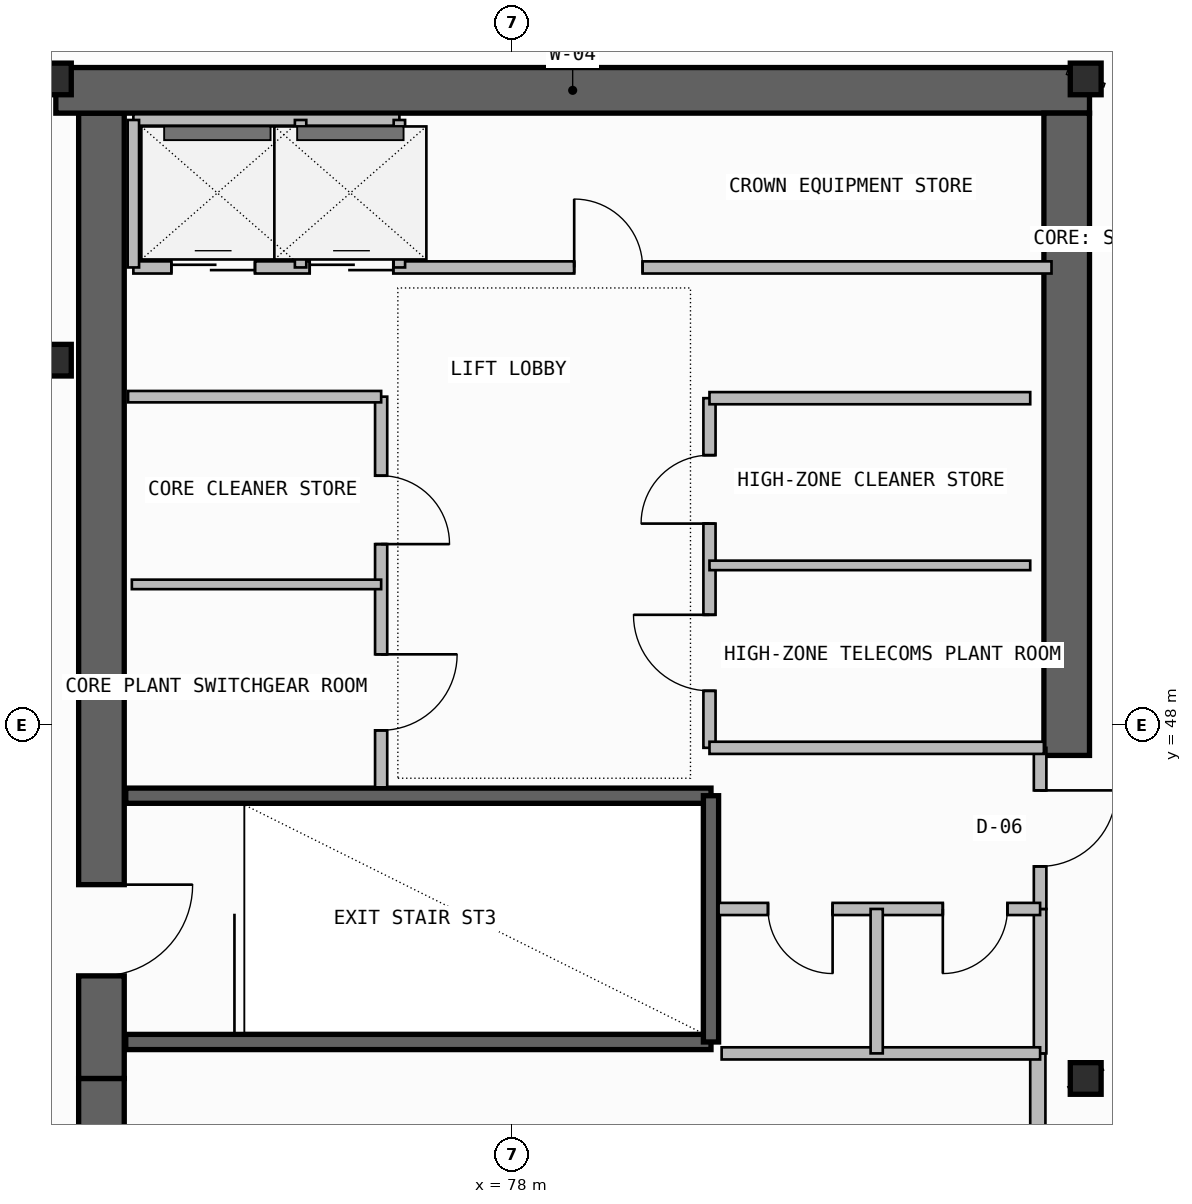
"""IFC4 building model, lengths in metres.
Left out: names, types, materials, properties, quantities, classifications, styles, units other than length and angle.
Written with IfcOpenShell. Run it as: python <this file> out.ifc"""

import sys

from ifc_helpers import new_model, si_unit, direction, frame, frame_2d, origin, origin_2d, place, context, subcontext, project, spatial, rectangle, i_section, extrude, element, fill, save


model = new_model("IFC4")
c1 = context("Model", 3, precision=1e-05, world=origin(), true_north=direction((0.0, 1.0)))
c2 = subcontext(c1, "Body", "Model", "MODEL_VIEW")
j1 = project(units=[si_unit("LENGTHUNIT", "METRE"), si_unit("PLANEANGLEUNIT", "RADIAN")], contexts=[c1])
p1 = place(None, origin())
s1 = spatial("IfcSite", under=j1, at=p1, CompositionType="ELEMENT")
p2 = place(p1, origin())
s2 = spatial("IfcBuilding", under=s1, at=p2, CompositionType="ELEMENT")
p3 = place(p2, frame((0.0, 0.0, 292.42)))
s3 = spatial("IfcBuildingStorey", under=s2, at=p3, CompositionType="ELEMENT", Elevation=292.42)
p4 = place(p3, frame((72.6, 35.5, -0.26), z_axis=(0.0, 0.0, 1.0), x_axis=(0.0, 1.0, 0.0)))
e1 = element("IfcWall", 1, at=p4, inside=s3, PredefinedType="SHEAR", context=c2, shape_type="SweptSolid", body=[
    extrude(rectangle(XDim=7.85, YDim=0.6, at=frame_2d((3.925, 0.0))), origin(), (0.0, 0.0, 1.0), 5.82),
])
p5 = place(p4, frame((1.45, 0.0, 0.26)))
e2 = element("IfcOpeningElement", 2, at=p5, cuts=e1, PredefinedType="OPENING", context=c2, shape_type="SweptSolid", body=[
    extrude(rectangle(XDim=1.2, YDim=2.2, at=frame_2d((0.6, 1.1))), frame((0.0, 0.31, 0.0), z_axis=(0.0, -1.0, 0.0), x_axis=(1.0, 0.0, 0.0)), (0.0, 0.0, 1.0), 0.62),
])
p6 = place(p3, frame((72.6, 43.35, -0.26), z_axis=(0.0, 0.0, 1.0), x_axis=(0.0, 1.0, 0.0)))
e3 = element("IfcWall", 3, at=p6, inside=s3, PredefinedType="SHEAR", context=c2, shape_type="SweptSolid", body=[
    extrude(rectangle(XDim=12.7, YDim=0.6, at=frame_2d((6.35, 0.0))), origin(), (0.0, 0.0, 1.0), 5.82),
])
p7 = place(p6, frame((1.35, 0.0, 0.26)))
e4 = element("IfcOpeningElement", 4, at=p7, cuts=e3, PredefinedType="OPENING", context=c2, shape_type="SweptSolid", body=[
    extrude(rectangle(XDim=1.2, YDim=2.2, at=frame_2d((0.6, 1.1))), frame((0.0, 0.31, 0.0), z_axis=(0.0, -1.0, 0.0), x_axis=(1.0, 0.0, 0.0)), (0.0, 0.0, 1.0), 0.62),
])
p8 = place(p3, frame((72.0, 56.35, -0.26), z_axis=(0.0, 0.0, 1.0), x_axis=(1.0, 0.0, 0.0)))
e5 = element("IfcWall", 5, at=p8, inside=s3, PredefinedType="SHEAR", context=c2, shape_type="SweptSolid", body=[
    extrude(rectangle(XDim=13.6, YDim=0.6, at=frame_2d((6.8, 0.0))), origin(), (0.0, 0.0, 1.0), 5.82),
])
p9 = place(p3, frame((85.3, 47.6, -0.26), z_axis=(0.0, 0.0, 1.0), x_axis=(0.0, 1.0, 0.0)))
e6 = element("IfcWall", 6, at=p9, inside=s3, PredefinedType="SHEAR", context=c2, shape_type="SweptSolid", body=[
    extrude(rectangle(XDim=8.45, YDim=0.6, at=frame_2d((4.225, 0.0))), origin(), (0.0, 0.0, 1.0), 5.82),
])
for number, where, z_axis, x_axis in (
    (7, (85.55, 43.35, 0.0), (0.0, 0.0, 1.0), (1.0, 0.0, 0.0)),
    (8, (72.0, 52.8, 0.0), (0.0, 0.0, 1.0), (1.0, 0.0, 0.0)),
    (9, (72.0, 56.5, 0.0), (0.0, 0.0, 1.0), (1.0, 0.0, 0.0)),
    (10, (85.55, 56.5, 0.0), (0.0, 0.0, 1.0), (1.0, 0.0, 0.0)),
):
    element("IfcColumn", number, at=place(p3, frame(where, z_axis=z_axis, x_axis=x_axis)), inside=s3, PredefinedType="COLUMN", context=c2, shape_type="SweptSolid", body=[
        extrude(i_section(OverallWidth=0.406, OverallDepth=0.416, WebThickness=0.03, FlangeThickness=0.048, FilletRadius=0.015, at=origin_2d()), origin(), (0.0, 0.0, 1.0), 5.76),
    ])
p10 = place(p3, frame((84.92, 38.85, 0.0), z_axis=(0.0, 0.0, 1.0), x_axis=(0.0, 1.0, 0.0)))
e11 = element("IfcWall", 11, at=p10, inside=s3, PredefinedType="SOLIDWALL", context=c2, shape_type="SweptSolid", body=[
    extrude(rectangle(XDim=4.83, YDim=0.2, at=frame_2d((2.415, 0.0))), origin(), (0.0, 0.0, 1.0), 5.56),
])
p11 = place(p10, frame((1.25, 0.0, 0.0)))
e12 = element("IfcOpeningElement", 12, at=p11, cuts=e11, PredefinedType="OPENING", context=c2, shape_type="SweptSolid", body=[
    extrude(rectangle(XDim=1.1, YDim=2.2, at=frame_2d((0.55, 1.1))), frame((0.0, 0.11, 0.0), z_axis=(0.0, -1.0, 0.0), x_axis=(1.0, 0.0, 0.0)), (0.0, 0.0, 1.0), 0.22),
])
for number, where, z_axis, x_axis in (
    (13, (72.92, 43.83, -0.26), (0.0, 0.0, 1.0), (1.0, 0.0, 0.0)),
    (14, (72.92, 47.07, -0.26), (0.0, 0.0, 1.0), (1.0, 0.0, 0.0)),
):
    element("IfcWall", number, at=place(p3, frame(where, z_axis=z_axis, x_axis=x_axis)), inside=s3, PredefinedType="SOLIDWALL", context=c2, shape_type="SweptSolid", body=[
        extrude(rectangle(XDim=7.7, YDim=0.2, at=frame_2d((3.85, 0.0))), origin(), (0.0, 0.0, 1.0), 5.82),
    ])
p12 = place(p3, frame((80.62, 43.83, -0.26), z_axis=(0.0, 0.0, 1.0), x_axis=(0.0, 1.0, 0.0)))
e15 = element("IfcWall", 15, at=p12, inside=s3, PredefinedType="SOLIDWALL", context=c2, shape_type="SweptSolid", body=[
    extrude(rectangle(XDim=3.24, YDim=0.2, at=frame_2d((1.62, 0.0))), origin(), (0.0, 0.0, 1.0), 5.82),
])
p13 = place(p3, frame((84.95, 43.68, 0.0), z_axis=(0.0, 0.0, 1.0), x_axis=(0.0, 1.0, 0.0)))
e16 = element("IfcWall", 16, at=p13, inside=s3, PredefinedType="PLUMBINGWALL", context=c2, shape_type="SweptSolid", body=[
    extrude(rectangle(XDim=1.9, YDim=0.165, at=frame_2d((0.95, 0.0))), origin(), (0.0, 0.0, 1.0), 5.56),
])
p14 = place(p3, frame((84.95, 45.58, 0.0), z_axis=(0.0, 0.0, 1.0), x_axis=(0.0, 1.0, 0.0)))
e17 = element("IfcWall", 17, at=p14, inside=s3, PredefinedType="PARTITIONING", context=c2, shape_type="SweptSolid", body=[
    extrude(rectangle(XDim=2.12, YDim=0.165, at=frame_2d((1.06, 0.0))), origin(), (0.0, 0.0, 1.0), 5.56),
])
p15 = place(p14, frame((0.56, 0.0, 0.0)))
e18 = element("IfcOpeningElement", 18, at=p15, cuts=e17, PredefinedType="OPENING", context=c2, shape_type="SweptSolid", body=[
    extrude(rectangle(XDim=1.0, YDim=2.2, at=frame_2d((0.5, 1.1))), frame((0.0, 0.093, 0.0), z_axis=(0.0, -1.0, 0.0), x_axis=(1.0, 0.0, 0.0)), (0.0, 0.0, 1.0), 0.185),
])
p16 = place(p3, frame((80.72, 45.58, 0.0), z_axis=(0.0, 0.0, 1.0), x_axis=(1.0, 0.0, 0.0)))
e19 = element("IfcWall", 19, at=p16, inside=s3, PredefinedType="PLUMBINGWALL", context=c2, shape_type="SweptSolid", body=[
    extrude(rectangle(XDim=4.23, YDim=0.16, at=frame_2d((2.115, 0.0))), origin(), (0.0, 0.0, 1.0), 5.56),
])
p17 = place(p16, frame((0.65, 0.0, 0.0)))
e20 = element("IfcOpeningElement", 20, at=p17, cuts=e19, PredefinedType="OPENING", context=c2, shape_type="SweptSolid", body=[
    extrude(rectangle(XDim=0.85, YDim=2.05, at=frame_2d((0.425, 1.025))), frame((0.0, 0.09, 0.0), z_axis=(0.0, -1.0, 0.0), x_axis=(1.0, 0.0, 0.0)), (0.0, 0.0, 1.0), 0.18),
])
p18 = place(p16, frame((2.95, 0.0, 0.0)))
e21 = element("IfcOpeningElement", 21, at=p18, cuts=e19, PredefinedType="OPENING", context=c2, shape_type="SweptSolid", body=[
    extrude(rectangle(XDim=0.85, YDim=2.05, at=frame_2d((0.425, 1.025))), frame((0.0, 0.09, 0.0), z_axis=(0.0, -1.0, 0.0), x_axis=(1.0, 0.0, 0.0)), (0.0, 0.0, 1.0), 0.18),
])
p19 = place(p3, frame((80.76, 43.68, 0.0), z_axis=(0.0, 0.0, 1.0), x_axis=(1.0, 0.0, 0.0)))
e22 = element("IfcWall", 22, at=p19, inside=s3, PredefinedType="PLUMBINGWALL", context=c2, shape_type="SweptSolid", body=[
    extrude(rectangle(XDim=4.19, YDim=0.16, at=frame_2d((2.095, 0.0))), origin(), (0.0, 0.0, 1.0), 5.56),
])
p20 = place(p3, frame((82.8, 43.68, 0.0), z_axis=(0.0, 0.0, 1.0), x_axis=(0.0, 1.0, 0.0)))
e23 = element("IfcWall", 23, at=p20, inside=s3, PredefinedType="PLUMBINGWALL", context=c2, shape_type="SweptSolid", body=[
    extrude(rectangle(XDim=1.9, YDim=0.16, at=frame_2d((0.95, 0.0))), origin(), (0.0, 0.0, 1.0), 5.56),
])
p21 = place(p3, frame((76.28, 47.18, 0.0), z_axis=(0.0, 0.0, 1.0), x_axis=(0.0, 1.0, 0.0)))
e24 = element("IfcWall", 24, at=p21, inside=s3, PredefinedType="SOLIDWALL", context=c2, shape_type="SweptSolid", body=[
    extrude(rectangle(XDim=5.14, YDim=0.16, at=frame_2d((2.57, 0.0))), origin(), (0.0, 0.0, 1.0), 5.56),
])
p22 = place(p21, frame((0.75, 0.0, 0.0)))
e25 = element("IfcOpeningElement", 25, at=p22, cuts=e24, PredefinedType="OPENING", context=c2, shape_type="SweptSolid", body=[
    extrude(rectangle(XDim=1.0, YDim=2.2, at=frame_2d((0.5, 1.1))), frame((0.0, 0.09, 0.0), z_axis=(0.0, -1.0, 0.0), x_axis=(1.0, 0.0, 0.0)), (0.0, 0.0, 1.0), 0.18),
])
p23 = place(p21, frame((3.2, 0.0, 0.0)))
e26 = element("IfcOpeningElement", 26, at=p23, cuts=e24, PredefinedType="OPENING", context=c2, shape_type="SweptSolid", body=[
    extrude(rectangle(XDim=0.9, YDim=2.1, at=frame_2d((0.45, 1.05))), frame((0.0, 0.09, 0.0), z_axis=(0.0, -1.0, 0.0), x_axis=(1.0, 0.0, 0.0)), (0.0, 0.0, 1.0), 0.18),
])
p24 = place(p3, frame((72.95, 52.32, 0.0), z_axis=(0.0, 0.0, 1.0), x_axis=(1.0, 0.0, 0.0)))
e27 = element("IfcWall", 27, at=p24, inside=s3, PredefinedType="SOLIDWALL", context=c2, shape_type="SweptSolid", body=[
    extrude(rectangle(XDim=3.33, YDim=0.15, at=frame_2d((1.665, 0.0))), origin(), (0.0, 0.0, 1.0), 5.56),
])
p25 = place(p3, frame((73.0, 49.85, 0.0), z_axis=(0.0, 0.0, 1.0), x_axis=(1.0, 0.0, 0.0)))
e28 = element("IfcWall", 28, at=p25, inside=s3, PredefinedType="PARTITIONING", context=c2, shape_type="SweptSolid", body=[
    extrude(rectangle(XDim=3.28, YDim=0.125, at=frame_2d((1.64, 0.0))), origin(), (0.0, 0.0, 1.0), 5.56),
])
p26 = place(p3, frame((80.6, 47.7, 0.0), z_axis=(0.0, 0.0, 1.0), x_axis=(0.0, 1.0, 0.0)))
e29 = element("IfcWall", 29, at=p26, inside=s3, PredefinedType="SOLIDWALL", context=c2, shape_type="SweptSolid", body=[
    extrude(rectangle(XDim=4.6, YDim=0.16, at=frame_2d((2.3, 0.0))), origin(), (0.0, 0.0, 1.0), 5.56),
])
p27 = place(p26, frame((0.75, 0.0, 0.0)))
e30 = element("IfcOpeningElement", 30, at=p27, cuts=e29, PredefinedType="OPENING", context=c2, shape_type="SweptSolid", body=[
    extrude(rectangle(XDim=1.0, YDim=2.2, at=frame_2d((0.5, 1.1))), frame((0.0, 0.09, 0.0), z_axis=(0.0, -1.0, 0.0), x_axis=(1.0, 0.0, 0.0)), (0.0, 0.0, 1.0), 0.18),
])
p28 = place(p26, frame((2.95, 0.0, 0.0)))
e31 = element("IfcOpeningElement", 31, at=p28, cuts=e29, PredefinedType="OPENING", context=c2, shape_type="SweptSolid", body=[
    extrude(rectangle(XDim=0.9, YDim=2.1, at=frame_2d((0.45, 1.05))), frame((0.0, 0.09, 0.0), z_axis=(0.0, -1.0, 0.0), x_axis=(1.0, 0.0, 0.0)), (0.0, 0.0, 1.0), 0.18),
])
p29 = place(p3, frame((80.6, 47.7, 0.0), z_axis=(0.0, 0.0, 1.0), x_axis=(1.0, 0.0, 0.0)))
e32 = element("IfcWall", 32, at=p29, inside=s3, PredefinedType="SOLIDWALL", context=c2, shape_type="SweptSolid", body=[
    extrude(rectangle(XDim=4.4, YDim=0.16, at=frame_2d((2.2, 0.0))), origin(), (0.0, 0.0, 1.0), 5.56),
])
p30 = place(p3, frame((80.6, 52.3, 0.0), z_axis=(0.0, 0.0, 1.0), x_axis=(1.0, 0.0, 0.0)))
e33 = element("IfcWall", 33, at=p30, inside=s3, PredefinedType="SOLIDWALL", context=c2, shape_type="SweptSolid", body=[
    extrude(rectangle(XDim=4.22, YDim=0.16, at=frame_2d((2.11, 0.0))), origin(), (0.0, 0.0, 1.0), 5.56),
])
p31 = place(p3, frame((80.6, 50.1, 0.0), z_axis=(0.0, 0.0, 1.0), x_axis=(1.0, 0.0, 0.0)))
e34 = element("IfcWall", 34, at=p31, inside=s3, PredefinedType="PARTITIONING", context=c2, shape_type="SweptSolid", body=[
    extrude(rectangle(XDim=4.22, YDim=0.125, at=frame_2d((2.11, 0.0))), origin(), (0.0, 0.0, 1.0), 5.56),
])
p32 = place(p3, frame((73.02, 54.02, 0.0), z_axis=(0.0, 0.0, 1.0), x_axis=(1.0, 0.0, 0.0)))
e35 = element("IfcWall", 35, at=p32, inside=s3, PredefinedType="SOLIDWALL", context=c2, shape_type="SweptSolid", body=[
    extrude(rectangle(XDim=12.08, YDim=0.16, at=frame_2d((6.04, 0.0))), origin(), (0.0, 0.0, 1.0), 5.56),
])
p33 = place(p32, frame((0.5, 0.0, 0.0)))
e36 = element("IfcOpeningElement", 36, at=p33, cuts=e35, PredefinedType="OPENING", context=c2, shape_type="SweptSolid", body=[
    extrude(rectangle(XDim=1.1, YDim=2.25, at=frame_2d((0.55, 1.125))), frame((0.0, 0.09, 0.0), z_axis=(0.0, -1.0, 0.0), x_axis=(1.0, 0.0, 0.0)), (0.0, 0.0, 1.0), 0.18),
])
p34 = place(p32, frame((2.32, 0.0, 0.0)))
e37 = element("IfcOpeningElement", 37, at=p34, cuts=e35, PredefinedType="OPENING", context=c2, shape_type="SweptSolid", body=[
    extrude(rectangle(XDim=1.1, YDim=2.25, at=frame_2d((0.55, 1.125))), frame((0.0, 0.09, 0.0), z_axis=(0.0, -1.0, 0.0), x_axis=(1.0, 0.0, 0.0)), (0.0, 0.0, 1.0), 0.18),
])
p35 = place(p32, frame((5.8, 0.0, 0.0)))
e38 = element("IfcOpeningElement", 38, at=p35, cuts=e35, PredefinedType="OPENING", context=c2, shape_type="SweptSolid", body=[
    extrude(rectangle(XDim=0.9, YDim=2.1, at=frame_2d((0.45, 1.05))), frame((0.0, 0.09, 0.0), z_axis=(0.0, -1.0, 0.0), x_axis=(1.0, 0.0, 0.0)), (0.0, 0.0, 1.0), 0.18),
])
p36 = place(p3, frame((73.02, 55.96, 0.0), z_axis=(0.0, 0.0, 1.0), x_axis=(1.0, 0.0, 0.0)))
e39 = element("IfcWall", 39, at=p36, inside=s3, PredefinedType="SOLIDWALL", context=c2, shape_type="SweptSolid", body=[
    extrude(rectangle(XDim=3.5, YDim=0.15, at=frame_2d((1.75, 0.0))), origin(), (0.0, 0.0, 1.0), 5.56),
])
p37 = place(p3, frame((73.02, 54.02, 0.0), z_axis=(0.0, 0.0, 1.0), x_axis=(0.0, 1.0, 0.0)))
e40 = element("IfcWall", 40, at=p37, inside=s3, PredefinedType="PLUMBINGWALL", context=c2, shape_type="SweptSolid", body=[
    extrude(rectangle(XDim=1.94, YDim=0.15, at=frame_2d((0.97, 0.0))), origin(), (0.0, 0.0, 1.0), 5.56),
])
p38 = place(p3, frame((76.52, 54.02, 0.0), z_axis=(0.0, 0.0, 1.0), x_axis=(0.0, 1.0, 0.0)))
e41 = element("IfcWall", 41, at=p38, inside=s3, PredefinedType="SOLIDWALL", context=c2, shape_type="SweptSolid", body=[
    extrude(rectangle(XDim=1.94, YDim=0.15, at=frame_2d((0.97, 0.0))), origin(), (0.0, 0.0, 1.0), 5.56),
])
p39 = place(p3, frame((75.22, 54.02, 0.0), z_axis=(0.0, 0.0, 1.0), x_axis=(0.0, 1.0, 0.0)))
e42 = element("IfcWall", 42, at=p39, inside=s3, PredefinedType="PLUMBINGWALL", context=c2, shape_type="SweptSolid", body=[
    extrude(rectangle(XDim=1.94, YDim=0.15, at=frame_2d((0.97, 0.0))), origin(), (0.0, 0.0, 1.0), 5.56),
])
p40 = place(p7, frame((1.2, 0.0, 0.0), z_axis=(0.0, 0.0, 1.0), x_axis=(-1.0, 0.0, 0.0)))
e43 = element("IfcDoor", 43, at=p40, inside=s3, OperationType="SINGLE_SWING_LEFT", PredefinedType="USERDEFINED", context=c2, shape_type="SweptSolid", body=[
    extrude(rectangle(XDim=1.2, YDim=2.2, at=frame_2d((0.6, 1.1))), frame((0.0, 0.025, 0.0), z_axis=(0.0, -1.0, 0.0), x_axis=(1.0, 0.0, 0.0)), (0.0, 0.0, 1.0), 0.05),
])
fill(e4, e43)
p41 = place(p15, frame((1.0, 0.0, 0.0), z_axis=(0.0, 0.0, 1.0), x_axis=(-1.0, 0.0, 0.0)))
e44 = element("IfcDoor", 44, at=p41, inside=s3, OperationType="SINGLE_SWING_LEFT", PredefinedType="DOOR", context=c2, shape_type="SweptSolid", body=[
    extrude(rectangle(XDim=1.0, YDim=2.2, at=frame_2d((0.5, 1.1))), frame((0.0, 0.025, 0.0), z_axis=(0.0, -1.0, 0.0), x_axis=(1.0, 0.0, 0.0)), (0.0, 0.0, 1.0), 0.05),
])
fill(e18, e44)
p42 = place(p17, frame((0.85, 0.0, 0.0), z_axis=(0.0, 0.0, 1.0), x_axis=(-1.0, 0.0, 0.0)))
e45 = element("IfcDoor", 45, at=p42, inside=s3, OperationType="SINGLE_SWING_LEFT", PredefinedType="DOOR", context=c2, shape_type="SweptSolid", body=[
    extrude(rectangle(XDim=0.85, YDim=2.05, at=frame_2d((0.425, 1.025))), frame((0.0, 0.025, 0.0), z_axis=(0.0, -1.0, 0.0), x_axis=(1.0, 0.0, 0.0)), (0.0, 0.0, 1.0), 0.05),
])
fill(e20, e45)
p43 = place(p18, frame((0.85, 0.0, 0.0), z_axis=(0.0, 0.0, 1.0), x_axis=(-1.0, 0.0, 0.0)))
e46 = element("IfcDoor", 46, at=p43, inside=s3, OperationType="SINGLE_SWING_RIGHT", PredefinedType="DOOR", context=c2, shape_type="SweptSolid", body=[
    extrude(rectangle(XDim=0.85, YDim=2.05, at=frame_2d((0.425, 1.025))), frame((0.0, 0.025, 0.0), z_axis=(0.0, -1.0, 0.0), x_axis=(1.0, 0.0, 0.0)), (0.0, 0.0, 1.0), 0.05),
])
fill(e21, e46)
p44 = place(p22, frame((1.0, 0.0, 0.0), z_axis=(0.0, 0.0, 1.0), x_axis=(-1.0, 0.0, 0.0)))
e47 = element("IfcDoor", 47, at=p44, inside=s3, OperationType="SINGLE_SWING_LEFT", PredefinedType="DOOR", context=c2, shape_type="SweptSolid", body=[
    extrude(rectangle(XDim=1.0, YDim=2.2, at=frame_2d((0.5, 1.1))), frame((0.0, 0.025, 0.0), z_axis=(0.0, -1.0, 0.0), x_axis=(1.0, 0.0, 0.0)), (0.0, 0.0, 1.0), 0.05),
])
fill(e25, e47)
p45 = place(p23, frame((0.9, 0.0, 0.0), z_axis=(0.0, 0.0, 1.0), x_axis=(-1.0, 0.0, 0.0)))
e48 = element("IfcDoor", 48, at=p45, inside=s3, OperationType="SINGLE_SWING_RIGHT", PredefinedType="DOOR", context=c2, shape_type="SweptSolid", body=[
    extrude(rectangle(XDim=0.9, YDim=2.1, at=frame_2d((0.45, 1.05))), frame((0.0, 0.025, 0.0), z_axis=(0.0, -1.0, 0.0), x_axis=(1.0, 0.0, 0.0)), (0.0, 0.0, 1.0), 0.05),
])
fill(e26, e48)
p46 = place(p27, origin())
e49 = element("IfcDoor", 49, at=p46, inside=s3, OperationType="SINGLE_SWING_RIGHT", PredefinedType="DOOR", context=c2, shape_type="SweptSolid", body=[
    extrude(rectangle(XDim=1.0, YDim=2.2, at=frame_2d((0.5, 1.1))), frame((0.0, 0.025, 0.0), z_axis=(0.0, -1.0, 0.0), x_axis=(1.0, 0.0, 0.0)), (0.0, 0.0, 1.0), 0.05),
])
fill(e30, e49)
p47 = place(p28, origin())
e50 = element("IfcDoor", 50, at=p47, inside=s3, OperationType="SINGLE_SWING_LEFT", PredefinedType="DOOR", context=c2, shape_type="SweptSolid", body=[
    extrude(rectangle(XDim=0.9, YDim=2.1, at=frame_2d((0.45, 1.05))), frame((0.0, 0.025, 0.0), z_axis=(0.0, -1.0, 0.0), x_axis=(1.0, 0.0, 0.0)), (0.0, 0.0, 1.0), 0.05),
])
fill(e31, e50)
p48 = place(p33, origin())
e51 = element("IfcDoor", 51, at=p48, inside=s3, OperationType="DOUBLE_DOOR_SLIDING", PredefinedType="DOOR", context=c2, shape_type="SweptSolid", body=[
    extrude(rectangle(XDim=1.1, YDim=2.25, at=frame_2d((0.55, 1.125))), frame((0.0, 0.025, 0.0), z_axis=(0.0, -1.0, 0.0), x_axis=(1.0, 0.0, 0.0)), (0.0, 0.0, 1.0), 0.05),
])
fill(e36, e51)
p49 = place(p34, origin())
e52 = element("IfcDoor", 52, at=p49, inside=s3, OperationType="DOUBLE_DOOR_SLIDING", PredefinedType="DOOR", context=c2, shape_type="SweptSolid", body=[
    extrude(rectangle(XDim=1.1, YDim=2.25, at=frame_2d((0.55, 1.125))), frame((0.0, 0.025, 0.0), z_axis=(0.0, -1.0, 0.0), x_axis=(1.0, 0.0, 0.0)), (0.0, 0.0, 1.0), 0.05),
])
fill(e37, e52)
p50 = place(p35, origin())
e53 = element("IfcDoor", 53, at=p50, inside=s3, OperationType="SINGLE_SWING_LEFT", PredefinedType="DOOR", context=c2, shape_type="SweptSolid", body=[
    extrude(rectangle(XDim=0.9, YDim=2.1, at=frame_2d((0.45, 1.05))), frame((0.0, 0.025, 0.0), z_axis=(0.0, -1.0, 0.0), x_axis=(1.0, 0.0, 0.0)), (0.0, 0.0, 1.0), 0.05),
])
fill(e38, e53)
save(model, sys.argv[1])
